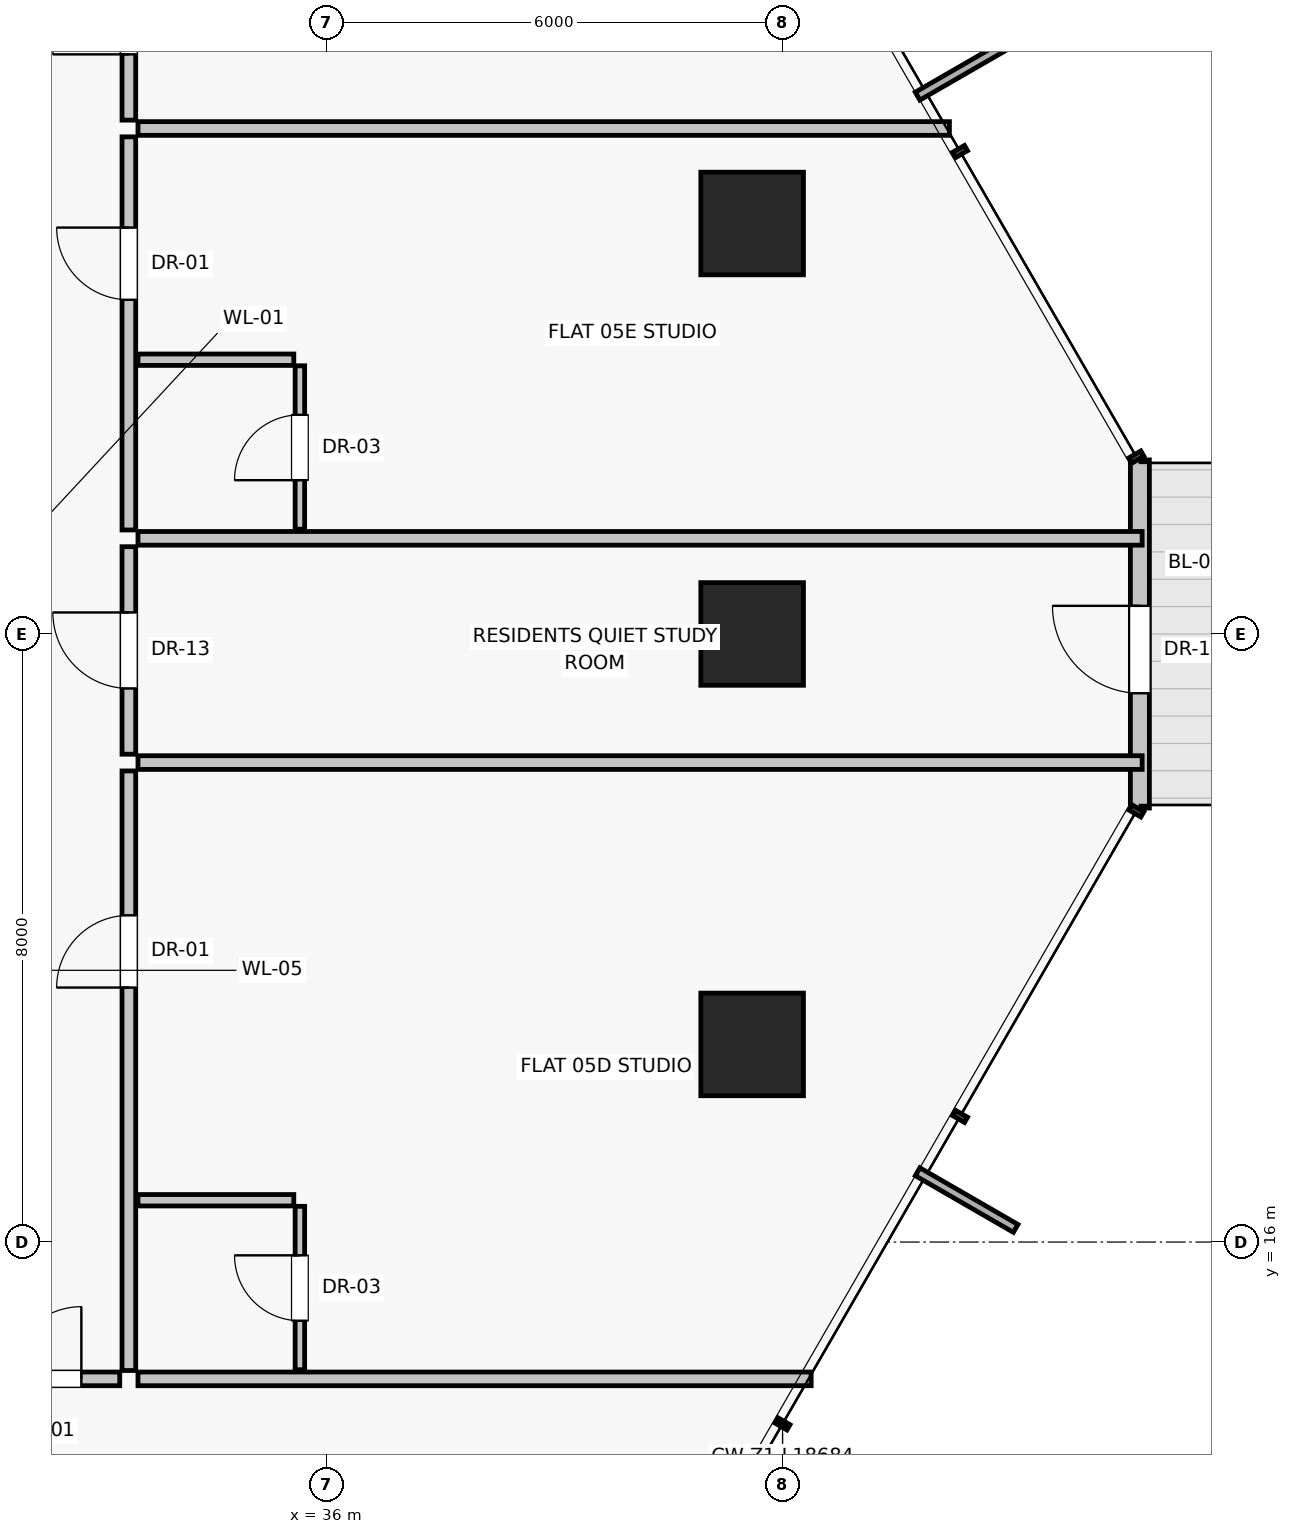
"""IFC4 building model, lengths in metres.
Left out: names, types, materials, properties, quantities, classifications, styles, units other than length and angle.
Written with IfcOpenShell. Run it as: python <this file> out.ifc"""

import sys

from ifc_helpers import new_model, si_unit, direction, frame, frame_2d, origin, origin_2d, place, context, subcontext, project, spatial, rectangle, extrude, source, transform, mapped, element, fill, save


model = new_model("IFC4")
c1 = context("Model", 3, precision=1e-05, world=origin(), true_north=direction((0.0, 1.0)))
c2 = subcontext(c1, "Body", "Model", "MODEL_VIEW")
j1 = project(units=[si_unit("LENGTHUNIT", "METRE"), si_unit("PLANEANGLEUNIT", "RADIAN")], contexts=[c1])
p1 = place(None, origin())
s1 = spatial("IfcSite", under=j1, at=p1, CompositionType="ELEMENT")
p2 = place(p1, origin())
s2 = spatial("IfcBuilding", under=s1, at=p2, CompositionType="ELEMENT")
p3 = place(p2, frame((0.0, 0.0, 22.8)))
s3 = spatial("IfcBuildingStorey", under=s2, at=p3, CompositionType="ELEMENT", Elevation=22.8)
p4 = place(p3, frame((41.6, 18.6, 0.0), z_axis=(0.0, 0.0, 1.0), x_axis=(1.0, 0.0, 0.0)))
e1 = element("IfcColumn", 1, at=p4, inside=s3, PredefinedType="COLUMN", context=c2, shape_type="SweptSolid", body=[
    extrude(rectangle(XDim=1.35, YDim=1.35, at=origin_2d()), origin(), (0.0, 0.0, 1.0), 4.5),
])
p5 = place(p3, frame((41.6, 24.0, -0.35), z_axis=(0.0, 0.0, 1.0), x_axis=(1.0, 0.0, 0.0)))
e2 = element("IfcColumn", 2, at=p5, inside=s3, PredefinedType="COLUMN", context=c2, shape_type="SweptSolid", body=[
    extrude(rectangle(XDim=1.35, YDim=1.35, at=origin_2d()), origin(), (0.0, 0.0, 1.0), 4.85),
])
p6 = place(p3, frame((41.6, 29.4, 0.0), z_axis=(0.0, 0.0, 1.0), x_axis=(1.0, 0.0, 0.0)))
e3 = element("IfcColumn", 3, at=p6, inside=s3, PredefinedType="COLUMN", context=c2, shape_type="SweptSolid", body=[
    extrude(rectangle(XDim=1.35, YDim=1.35, at=origin_2d()), origin(), (0.0, 0.0, 1.0), 4.5),
])
p7 = place(p3, frame((46.701, 21.71, 0.0), z_axis=(0.0, 0.0, 1.0), x_axis=(0.0, 1.0, 0.0)))
e4 = element("IfcWall", 4, at=p7, inside=s3, PredefinedType="SOLIDWALL", context=c2, shape_type="SweptSolid", body=[
    extrude(rectangle(XDim=4.58, YDim=0.25, at=frame_2d((2.29, 0.0))), origin(), (0.0, 0.0, 1.0), 4.25),
])
p8 = place(p7, frame((1.51, 0.0, 0.0)))
e5 = element("IfcOpeningElement", 5, at=p8, cuts=e4, PredefinedType="OPENING", context=c2, shape_type="SweptSolid", body=[
    extrude(rectangle(XDim=1.15, YDim=2.25, at=frame_2d((0.575, 1.125))), frame((0.0, 0.135, 0.0), z_axis=(0.0, -1.0, 0.0), x_axis=(1.0, 0.0, 0.0)), (0.0, 0.0, 1.0), 0.27),
])
p9 = place(p3, frame((33.52, 14.2, 0.0), z_axis=(0.0, 0.0, 1.0), x_axis=(1.0, 0.0, 0.0)))
e6 = element("IfcWall", 6, at=p9, inside=s3, PredefinedType="PARTITIONING", context=c2, shape_type="SweptSolid", body=[
    extrude(rectangle(XDim=8.857, YDim=0.18, at=frame_2d((4.428, 0.0))), origin(), (0.0, 0.0, 1.0), 4.25),
])
p10 = place(p3, frame((33.4, 22.418, 0.0), z_axis=(0.0, 0.0, 1.0), x_axis=(0.0, 1.0, 0.0)))
e7 = element("IfcWall", 7, at=p10, inside=s3, PredefinedType="PARTITIONING", context=c2, shape_type="SweptSolid", body=[
    extrude(rectangle(XDim=2.73, YDim=0.18, at=frame_2d((1.365, 0.0))), origin(), (0.0, 0.0, 1.0), 4.25),
])
p11 = place(p10, frame((0.865, 0.0, 0.0)))
e8 = element("IfcOpeningElement", 8, at=p11, cuts=e7, PredefinedType="OPENING", context=c2, shape_type="SweptSolid", body=[
    extrude(rectangle(XDim=1.0, YDim=2.01, at=frame_2d((0.5, 1.005))), frame((0.0, 0.1, 0.0), z_axis=(0.0, -1.0, 0.0), x_axis=(1.0, 0.0, 0.0)), (0.0, 0.0, 1.0), 0.2),
])
p12 = place(p3, frame((33.52, 22.308, 0.0), z_axis=(0.0, 0.0, 1.0), x_axis=(1.0, 0.0, 0.0)))
e9 = element("IfcWall", 9, at=p12, inside=s3, PredefinedType="PARTITIONING", context=c2, shape_type="SweptSolid", body=[
    extrude(rectangle(XDim=13.211, YDim=0.18, at=frame_2d((6.605, 0.0))), origin(), (0.0, 0.0, 1.0), 4.25),
])
p13 = place(p3, frame((33.4, 14.31, 0.0), z_axis=(0.0, 0.0, 1.0), x_axis=(0.0, 1.0, 0.0)))
e10 = element("IfcWall", 10, at=p13, inside=s3, PredefinedType="PARTITIONING", context=c2, shape_type="SweptSolid", body=[
    extrude(rectangle(XDim=7.888, YDim=0.18, at=frame_2d((3.944, 0.0))), origin(), (0.0, 0.0, 1.0), 4.25),
])
p14 = place(p13, frame((5.038, 0.0, 0.0)))
e11 = element("IfcOpeningElement", 11, at=p14, cuts=e10, PredefinedType="OPENING", context=c2, shape_type="SweptSolid", body=[
    extrude(rectangle(XDim=0.95, YDim=2.02, at=frame_2d((0.475, 1.01))), frame((0.0, 0.1, 0.0), z_axis=(0.0, -1.0, 0.0), x_axis=(1.0, 0.0, 0.0)), (0.0, 0.0, 1.0), 0.2),
])
p15 = place(p3, frame((33.52, 16.55, 0.0), z_axis=(0.0, 0.0, 1.0), x_axis=(1.0, 0.0, 0.0)))
e12 = element("IfcWall", 12, at=p15, inside=s3, PredefinedType="PARTITIONING", context=c2, shape_type="SweptSolid", body=[
    extrude(rectangle(XDim=2.05, YDim=0.15, at=frame_2d((1.025, 0.0))), origin(), (0.0, 0.0, 1.0), 4.25),
])
p16 = place(p3, frame((35.65, 14.32, 0.0), z_axis=(0.0, 0.0, 1.0), x_axis=(0.0, 1.0, 0.0)))
e13 = element("IfcWall", 13, at=p16, inside=s3, PredefinedType="PARTITIONING", context=c2, shape_type="SweptSolid", body=[
    extrude(rectangle(XDim=2.15, YDim=0.125, at=frame_2d((1.075, 0.0))), origin(), (0.0, 0.0, 1.0), 4.25),
])
p17 = place(p16, frame((0.645, 0.0, 0.0)))
e14 = element("IfcOpeningElement", 14, at=p17, cuts=e13, PredefinedType="OPENING", context=c2, shape_type="SweptSolid", body=[
    extrude(rectangle(XDim=0.86, YDim=2.01, at=frame_2d((0.43, 1.005))), frame((0.0, 0.073, 0.0), z_axis=(0.0, -1.0, 0.0), x_axis=(1.0, 0.0, 0.0)), (0.0, 0.0, 1.0), 0.145),
])
p18 = place(p3, frame((33.52, 25.258, 0.0), z_axis=(0.0, 0.0, 1.0), x_axis=(1.0, 0.0, 0.0)))
e15 = element("IfcWall", 15, at=p18, inside=s3, PredefinedType="PARTITIONING", context=c2, shape_type="SweptSolid", body=[
    extrude(rectangle(XDim=13.211, YDim=0.18, at=frame_2d((6.605, 0.0))), origin(), (0.0, 0.0, 1.0), 4.25),
])
p19 = place(p3, frame((33.4, 30.76, 0.0), z_axis=(0.0, 0.0, 1.0), x_axis=(0.0, 1.0, 0.0)))
e16 = element("IfcWall", 16, at=p19, inside=s3, PredefinedType="PARTITIONING", context=c2, shape_type="SweptSolid", body=[
    extrude(rectangle(XDim=2.73, YDim=0.18, at=frame_2d((1.365, 0.0))), origin(), (0.0, 0.0, 1.0), 4.25),
])
p20 = place(p19, frame((0.865, 0.0, 0.0)))
e17 = element("IfcOpeningElement", 17, at=p20, cuts=e16, PredefinedType="OPENING", context=c2, shape_type="SweptSolid", body=[
    extrude(rectangle(XDim=1.0, YDim=2.01, at=frame_2d((0.5, 1.005))), frame((0.0, 0.1, 0.0), z_axis=(0.0, -1.0, 0.0), x_axis=(1.0, 0.0, 0.0)), (0.0, 0.0, 1.0), 0.2),
])
p21 = place(p3, frame((33.52, 30.65, 0.0), z_axis=(0.0, 0.0, 1.0), x_axis=(1.0, 0.0, 0.0)))
e18 = element("IfcWall", 18, at=p21, inside=s3, PredefinedType="PARTITIONING", context=c2, shape_type="SweptSolid", body=[
    extrude(rectangle(XDim=10.675, YDim=0.18, at=frame_2d((5.338, 0.0))), origin(), (0.0, 0.0, 1.0), 3.549),
])
p22 = place(p3, frame((33.4, 25.368, 0.0), z_axis=(0.0, 0.0, 1.0), x_axis=(0.0, 1.0, 0.0)))
e19 = element("IfcWall", 19, at=p22, inside=s3, PredefinedType="PARTITIONING", context=c2, shape_type="SweptSolid", body=[
    extrude(rectangle(XDim=5.172, YDim=0.18, at=frame_2d((2.586, 0.0))), origin(), (0.0, 0.0, 1.0), 4.25),
])
p23 = place(p22, frame((3.028, 0.0, 0.0)))
e20 = element("IfcOpeningElement", 20, at=p23, cuts=e19, PredefinedType="OPENING", context=c2, shape_type="SweptSolid", body=[
    extrude(rectangle(XDim=0.95, YDim=2.02, at=frame_2d((0.475, 1.01))), frame((0.0, 0.1, 0.0), z_axis=(0.0, -1.0, 0.0), x_axis=(1.0, 0.0, 0.0)), (0.0, 0.0, 1.0), 0.2),
])
p24 = place(p3, frame((33.52, 27.608, 0.0), z_axis=(0.0, 0.0, 1.0), x_axis=(1.0, 0.0, 0.0)))
e21 = element("IfcWall", 21, at=p24, inside=s3, PredefinedType="PARTITIONING", context=c2, shape_type="SweptSolid", body=[
    extrude(rectangle(XDim=2.05, YDim=0.15, at=frame_2d((1.025, 0.0))), origin(), (0.0, 0.0, 1.0), 4.25),
])
p25 = place(p3, frame((35.65, 25.378, 0.0), z_axis=(0.0, 0.0, 1.0), x_axis=(0.0, 1.0, 0.0)))
e22 = element("IfcWall", 22, at=p25, inside=s3, PredefinedType="PARTITIONING", context=c2, shape_type="SweptSolid", body=[
    extrude(rectangle(XDim=2.15, YDim=0.125, at=frame_2d((1.075, 0.0))), origin(), (0.0, 0.0, 1.0), 4.25),
])
p26 = place(p25, frame((0.645, 0.0, 0.0)))
e23 = element("IfcOpeningElement", 23, at=p26, cuts=e22, PredefinedType="OPENING", context=c2, shape_type="SweptSolid", body=[
    extrude(rectangle(XDim=0.86, YDim=2.01, at=frame_2d((0.43, 1.005))), frame((0.0, 0.073, 0.0), z_axis=(0.0, -1.0, 0.0), x_axis=(1.0, 0.0, 0.0)), (0.0, 0.0, 1.0), 0.145),
])
p27 = place(p3, frame((31.32, 14.2, 0.0), z_axis=(0.0, 0.0, 1.0), x_axis=(1.0, 0.0, 0.0)))
e24 = element("IfcWall", 24, at=p27, inside=s3, PredefinedType="PARTITIONING", context=c2, shape_type="SweptSolid", body=[
    extrude(rectangle(XDim=1.96, YDim=0.18, at=frame_2d((0.98, 0.0))), origin(), (0.0, 0.0, 1.0), 4.25),
])
p28 = place(p27, frame((0.505, 0.0, 0.0)))
e25 = element("IfcOpeningElement", 25, at=p28, cuts=e24, PredefinedType="OPENING", context=c2, shape_type="SweptSolid", body=[
    extrude(rectangle(XDim=0.95, YDim=2.02, at=frame_2d((0.475, 1.01))), frame((0.0, 0.1, 0.0), z_axis=(0.0, -1.0, 0.0), x_axis=(1.0, 0.0, 0.0)), (0.0, 0.0, 1.0), 0.2),
])
m1 = source(origin(), c2, "Body", "SweptSolid", [
    extrude(rectangle(XDim=1.15, YDim=2.25, at=frame_2d((0.575, 1.125))), frame((0.0, 0.025, 0.0), z_axis=(0.0, -1.0, 0.0), x_axis=(1.0, 0.0, 0.0)), (0.0, 0.0, 1.0), 0.05),
])
p29 = place(p8, frame((1.15, 0.0, 0.0), z_axis=(0.0, 0.0, 1.0), x_axis=(-1.0, 0.0, 0.0)))
e26 = element("IfcDoor", 26, at=p29, inside=s3, OperationType="SINGLE_SWING_RIGHT", PredefinedType="DOOR", context=c2, shape_type="MappedRepresentation", body=[
    mapped(m1, transform((0.0, 0.0, 0.0), scale=1.0)),
])
fill(e5, e26)
m2 = source(origin(), c2, "Body", "SweptSolid", [
    extrude(rectangle(XDim=1.0, YDim=2.01, at=frame_2d((0.5, 1.005))), frame((0.0, 0.025, 0.0), z_axis=(0.0, -1.0, 0.0), x_axis=(1.0, 0.0, 0.0)), (0.0, 0.0, 1.0), 0.05),
])
p30 = place(p11, origin())
e27 = element("IfcDoor", 27, at=p30, inside=s3, OperationType="SINGLE_SWING_RIGHT", PredefinedType="DOOR", context=c2, shape_type="MappedRepresentation", body=[
    mapped(m2, transform((0.0, 0.0, 0.0), scale=1.0)),
])
fill(e8, e27)
m3 = source(origin(), c2, "Body", "SweptSolid", [
    extrude(rectangle(XDim=0.95, YDim=2.02, at=frame_2d((0.475, 1.01))), frame((0.0, 0.025, 0.0), z_axis=(0.0, -1.0, 0.0), x_axis=(1.0, 0.0, 0.0)), (0.0, 0.0, 1.0), 0.05),
])
p31 = place(p14, origin())
e28 = element("IfcDoor", 28, at=p31, inside=s3, OperationType="SINGLE_SWING_LEFT", PredefinedType="DOOR", context=c2, shape_type="MappedRepresentation", body=[
    mapped(m3, transform((0.0, 0.0, 0.0), scale=1.0)),
])
fill(e11, e28)
m4 = source(origin(), c2, "Body", "SweptSolid", [
    extrude(rectangle(XDim=0.86, YDim=2.01, at=frame_2d((0.43, 1.005))), frame((0.0, 0.025, 0.0), z_axis=(0.0, -1.0, 0.0), x_axis=(1.0, 0.0, 0.0)), (0.0, 0.0, 1.0), 0.05),
])
p32 = place(p17, origin())
e29 = element("IfcDoor", 29, at=p32, inside=s3, OperationType="SINGLE_SWING_RIGHT", PredefinedType="DOOR", context=c2, shape_type="MappedRepresentation", body=[
    mapped(m4, transform((0.0, 0.0, 0.0), scale=1.0)),
])
fill(e14, e29)
p33 = place(p20, origin())
e30 = element("IfcDoor", 30, at=p33, inside=s3, OperationType="SINGLE_SWING_LEFT", PredefinedType="DOOR", context=c2, shape_type="MappedRepresentation", body=[
    mapped(m2, transform((0.0, 0.0, 0.0), scale=1.0)),
])
fill(e17, e30)
p34 = place(p23, origin())
e31 = element("IfcDoor", 31, at=p34, inside=s3, OperationType="SINGLE_SWING_RIGHT", PredefinedType="DOOR", context=c2, shape_type="MappedRepresentation", body=[
    mapped(m3, transform((0.0, 0.0, 0.0), scale=1.0)),
])
fill(e20, e31)
p35 = place(p26, origin())
e32 = element("IfcDoor", 32, at=p35, inside=s3, OperationType="SINGLE_SWING_LEFT", PredefinedType="DOOR", context=c2, shape_type="MappedRepresentation", body=[
    mapped(m4, transform((0.0, 0.0, 0.0), scale=1.0)),
])
fill(e23, e32)
p36 = place(p28, origin())
e33 = element("IfcDoor", 33, at=p36, inside=s3, OperationType="SINGLE_SWING_RIGHT", PredefinedType="DOOR", context=c2, shape_type="MappedRepresentation", body=[
    mapped(m3, transform((0.0, 0.0, 0.0), scale=1.0)),
])
fill(e25, e33)
save(model, sys.argv[1])
